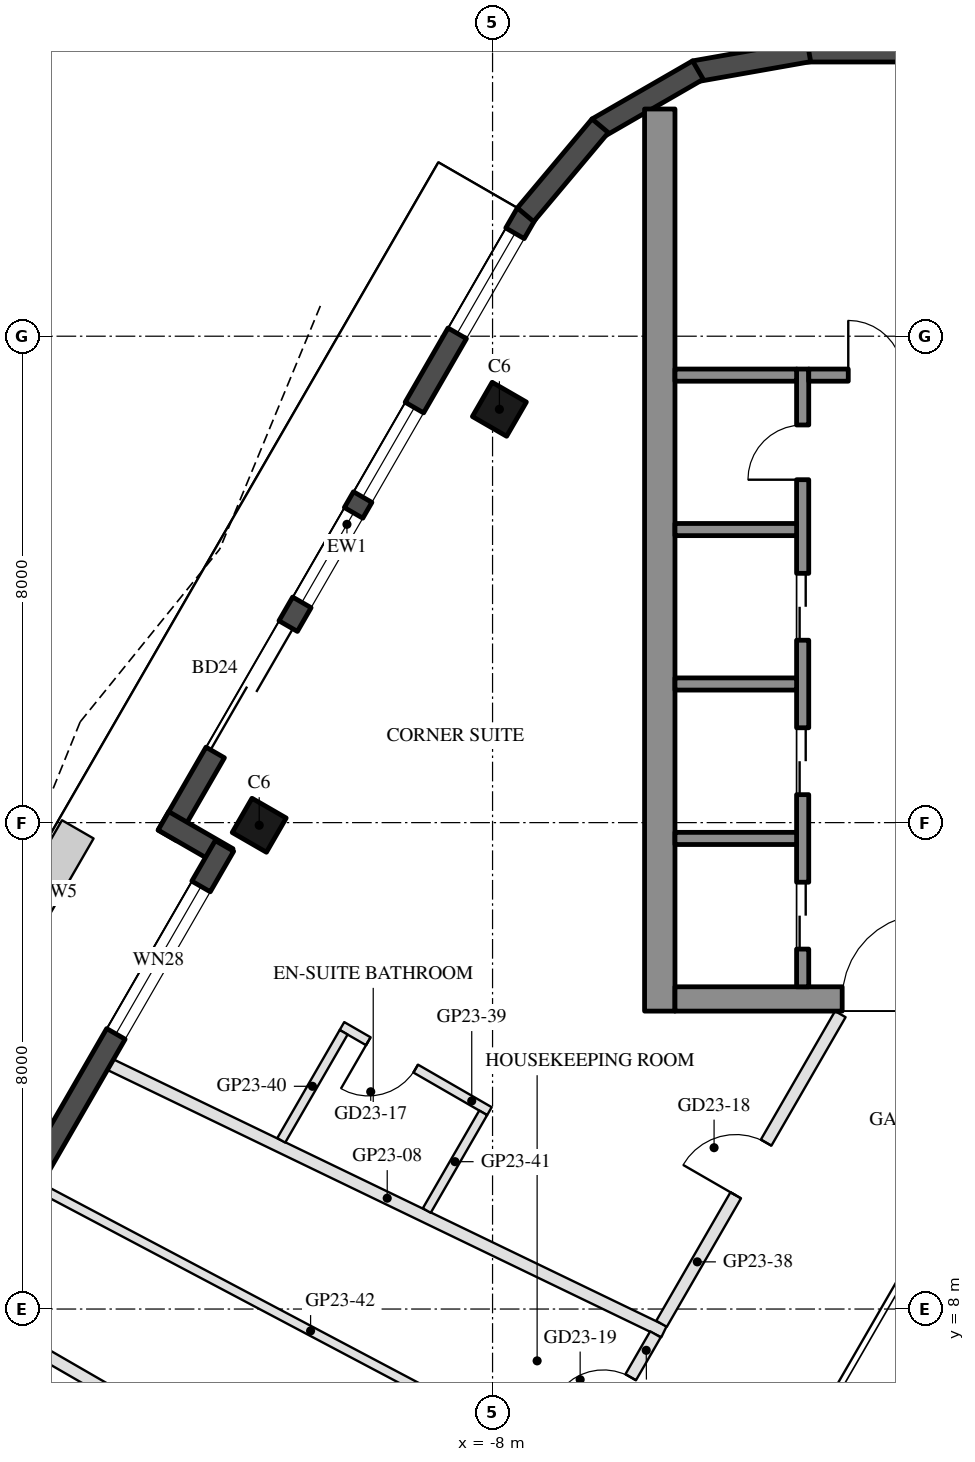
"""IFC4 building model, lengths in metres.
Left out: names, types, materials, properties, quantities, classifications, styles, units other than length and angle.
Written with IfcOpenShell. Run it as: python <this file> out.ifc"""

import sys

from ifc_helpers import new_model, si_unit, direction, frame, frame_2d, origin, origin_2d, place, context, subcontext, project, spatial, rectangle, hollow_rectangle, extrude, element, fill, save


model = new_model("IFC4")
c1 = context("Model", 3, precision=1e-05, world=origin(), true_north=direction((0.0, 1.0)))
c2 = subcontext(c1, "Body", "Model", "MODEL_VIEW")
j1 = project(units=[si_unit("LENGTHUNIT", "METRE"), si_unit("PLANEANGLEUNIT", "RADIAN")], contexts=[c1])
p1 = place(None, origin())
s1 = spatial("IfcSite", under=j1, at=p1, CompositionType="ELEMENT")
p2 = place(p1, origin())
s2 = spatial("IfcBuilding", under=s1, at=p2, CompositionType="ELEMENT")
p3 = place(p2, frame((0.0, 0.0, 246.7)))
s3 = spatial("IfcBuildingStorey", under=s2, at=p3, CompositionType="ELEMENT", Elevation=246.7)
for number, where, z_axis, x_axis in (
    (1, (-7.888, 22.798, 0.0), (0.0, 0.0, 1.0), (0.5, 0.866, 0.0)),
    (2, (-11.838, 15.957, 0.0), (0.0, 0.0, 1.0), (0.5, 0.866, 0.0)),
):
    element("IfcColumn", number, at=place(p3, frame(where, z_axis=z_axis, x_axis=x_axis)), inside=s3, PredefinedType="COLUMN", context=c2, shape_type="SweptSolid", body=[
        extrude(hollow_rectangle(XDim=0.65, YDim=0.65, WallThickness=0.03, at=origin_2d()), origin(), (0.0, 0.0, 1.0), 3.7),
    ])
p4 = place(p3, frame((-7.441, 26.022, 0.0), z_axis=(0.0, 0.0, 1.0), x_axis=(-0.499992533062, -0.86602971478, 0.0)))
e3 = element("IfcWall", 3, at=p4, inside=s3, PredefinedType="SOLIDWALL", context=c2, shape_type="SweptSolid", body=[
    extrude(rectangle(XDim=11.816, YDim=0.35, at=frame_2d((5.908, 0.0))), origin(), (0.0, 0.0, 1.0), 3.55),
])
p5 = place(p4, frame((0.381, 0.0, 0.3)))
e4 = element("IfcOpeningElement", 4, at=p5, cuts=e3, PredefinedType="OPENING", context=c2, shape_type="SweptSolid", body=[
    extrude(rectangle(XDim=1.9, YDim=2.65, at=frame_2d((0.95, 1.325))), frame((0.0, 0.185, 0.0), z_axis=(0.0, -1.0, 0.0), x_axis=(1.0, 0.0, 0.0)), (0.0, 0.0, 1.0), 0.37),
])
p6 = place(p4, frame((7.841, 0.0, 0.0)))
e5 = element("IfcOpeningElement", 5, at=p6, cuts=e3, PredefinedType="OPENING", context=c2, shape_type="SweptSolid", body=[
    extrude(rectangle(XDim=2.4, YDim=2.4, at=frame_2d((1.2, 1.2))), frame((0.0, 0.185, 0.0), z_axis=(0.0, -1.0, 0.0), x_axis=(1.0, 0.0, 0.0)), (0.0, 0.0, 1.0), 0.37),
])
p7 = place(p4, frame((3.69, 0.0, 0.3)))
e6 = element("IfcOpeningElement", 6, at=p7, cuts=e3, PredefinedType="OPENING", context=c2, shape_type="SweptSolid", body=[
    extrude(rectangle(XDim=1.7, YDim=2.65, at=frame_2d((0.85, 1.325))), frame((0.0, 0.185, 0.0), z_axis=(0.0, -1.0, 0.0), x_axis=(1.0, 0.0, 0.0)), (0.0, 0.0, 1.0), 0.37),
])
p8 = place(p4, frame((5.69, 0.0, 0.3)))
e7 = element("IfcOpeningElement", 7, at=p8, cuts=e3, PredefinedType="OPENING", context=c2, shape_type="SweptSolid", body=[
    extrude(rectangle(XDim=1.7, YDim=2.65, at=frame_2d((0.85, 1.325))), frame((0.0, 0.185, 0.0), z_axis=(0.0, -1.0, 0.0), x_axis=(1.0, 0.0, 0.0)), (0.0, 0.0, 1.0), 0.37),
])
p9 = place(p3, frame((-13.413, 16.029, 0.0), z_axis=(0.0, 0.0, 1.0), x_axis=(0.866005645448, -0.500034220881, 0.0)))
e8 = element("IfcWall", 8, at=p9, inside=s3, PredefinedType="SOLIDWALL", context=c2, shape_type="SweptSolid", body=[
    extrude(rectangle(XDim=1.22, YDim=0.35, at=frame_2d((0.61, 0.0))), origin(), (0.0, 0.0, 1.0), 3.55),
])
p10 = place(p3, frame((-12.409, 15.617, 0.0), z_axis=(0.0, 0.0, 1.0), x_axis=(-0.500003597184, -0.866023326939, 0.0)))
e9 = element("IfcWall", 9, at=p10, inside=s3, PredefinedType="SOLIDWALL", context=c2, shape_type="SweptSolid", body=[
    extrude(rectangle(XDim=6.74, YDim=0.35, at=frame_2d((3.37, 0.0))), origin(), (0.0, 0.0, 1.0), 3.55),
])
p11 = place(p10, frame((0.77, 0.0, 0.3)))
e10 = element("IfcOpeningElement", 10, at=p11, cuts=e9, PredefinedType="OPENING", context=c2, shape_type="SweptSolid", body=[
    extrude(rectangle(XDim=2.8, YDim=2.65, at=frame_2d((1.4, 1.325))), frame((0.0, 0.185, 0.0), z_axis=(0.0, -1.0, 0.0), x_axis=(1.0, 0.0, 0.0)), (0.0, 0.0, 1.0), 0.37),
])
p12 = place(p3, frame((2.829, 28.685, 0.0), z_axis=(0.0, 0.0, 1.0), x_axis=(-1.0, 0.0, 0.0)))
e11 = element("IfcWall", 11, at=p12, inside=s3, PredefinedType="SOLIDWALL", context=c2, shape_type="SweptSolid", body=[
    extrude(rectangle(XDim=5.658, YDim=0.35, at=frame_2d((2.829, 0.0))), origin(), (0.0, 0.0, 1.0), 3.55),
])
for number, where, z_axis, x_axis in (
    (12, (-2.799, 28.688, 0.0), (0.0, 0.0, 1.0), (-0.985, -0.174, 0.0)),
    (13, (-4.623, 28.377, 0.0), (0.0, 0.0, 1.0), (-0.866, -0.5, 0.0)),
):
    element("IfcWall", number, at=place(p3, frame(where, z_axis=z_axis, x_axis=x_axis)), inside=s3, PredefinedType="SOLIDWALL", context=c2, shape_type="SweptSolid", body=[
        extrude(rectangle(XDim=1.91, YDim=0.35, at=frame_2d((0.955, 0.0))), origin(), (0.0, 0.0, 1.0), 3.55),
    ])
p13 = place(p3, frame((-6.23, 27.461, 0.0), z_axis=(0.0, 0.0, 1.0), x_axis=(-0.642808304945, -0.766027077259, 0.0)))
e14 = element("IfcWall", 14, at=p13, inside=s3, PredefinedType="SOLIDWALL", context=c2, shape_type="SweptSolid", body=[
    extrude(rectangle(XDim=1.91, YDim=0.35, at=frame_2d((0.955, 0.0))), origin(), (0.0, 0.0, 1.0), 3.55),
])
p14 = place(p3, frame((-5.25, 12.9, 0.0), z_axis=(0.0, 0.0, 1.0), x_axis=(0.0, 1.0, 0.0)))
e15 = element("IfcWall", 15, at=p14, inside=s3, PredefinedType="SHEAR", context=c2, shape_type="SweptSolid", body=[
    extrude(rectangle(XDim=14.837, YDim=0.5, at=frame_2d((7.418, 0.0))), origin(), (0.0, 0.0, 1.0), 3.5),
])
p15 = place(p3, frame((5.0, 13.1, 0.0), z_axis=(0.0, 0.0, 1.0), x_axis=(-1.0, 0.0, 0.0)))
e16 = element("IfcWall", 16, at=p15, inside=s3, PredefinedType="SHEAR", context=c2, shape_type="SweptSolid", body=[
    extrude(rectangle(XDim=10.0, YDim=0.4, at=frame_2d((5.0, 0.0))), origin(), (0.0, 0.0, 1.0), 3.5),
])
p16 = place(p15, frame((3.55, 0.0, 0.0)))
e17 = element("IfcOpeningElement", 17, at=p16, cuts=e16, PredefinedType="OPENING", context=c2, shape_type="SweptSolid", body=[
    extrude(rectangle(XDim=1.1, YDim=2.1, at=frame_2d((0.55, 1.05))), frame((0.0, 0.21, 0.0), z_axis=(0.0, -1.0, 0.0), x_axis=(1.0, 0.0, 0.0)), (0.0, 0.0, 1.0), 0.42),
])
p17 = place(p15, frame((5.85, 0.0, 0.0)))
e18 = element("IfcOpeningElement", 18, at=p17, cuts=e16, PredefinedType="OPENING", context=c2, shape_type="SweptSolid", body=[
    extrude(rectangle(XDim=1.4, YDim=2.1, at=frame_2d((0.7, 1.05))), frame((0.0, 0.21, 0.0), z_axis=(0.0, -1.0, 0.0), x_axis=(1.0, 0.0, 0.0)), (0.0, 0.0, 1.0), 0.42),
])
p18 = place(p3, frame((-2.9, 13.3, 0.0), z_axis=(0.0, 0.0, 1.0), x_axis=(0.0, 1.0, 0.0)))
e19 = element("IfcWall", 19, at=p18, inside=s3, PredefinedType="SHEAR", context=c2, shape_type="SweptSolid", body=[
    extrude(rectangle(XDim=10.16, YDim=0.2, at=frame_2d((5.08, 0.0))), origin(), (0.0, 0.0, 1.0), 3.5),
])
p19 = place(p18, frame((0.62, 0.0, 0.0)))
e20 = element("IfcOpeningElement", 20, at=p19, cuts=e19, PredefinedType="OPENING", context=c2, shape_type="SweptSolid", body=[
    extrude(rectangle(XDim=1.1, YDim=2.1, at=frame_2d((0.55, 1.05))), frame((0.0, 0.11, 0.0), z_axis=(0.0, -1.0, 0.0), x_axis=(1.0, 0.0, 0.0)), (0.0, 0.0, 1.0), 0.22),
])
p20 = place(p18, frame((3.16, 0.0, 0.0)))
e21 = element("IfcOpeningElement", 21, at=p20, cuts=e19, PredefinedType="OPENING", context=c2, shape_type="SweptSolid", body=[
    extrude(rectangle(XDim=1.1, YDim=2.1, at=frame_2d((0.55, 1.05))), frame((0.0, 0.11, 0.0), z_axis=(0.0, -1.0, 0.0), x_axis=(1.0, 0.0, 0.0)), (0.0, 0.0, 1.0), 0.22),
])
p21 = place(p18, frame((5.7, 0.0, 0.0)))
e22 = element("IfcOpeningElement", 22, at=p21, cuts=e19, PredefinedType="OPENING", context=c2, shape_type="SweptSolid", body=[
    extrude(rectangle(XDim=1.1, YDim=2.1, at=frame_2d((0.55, 1.05))), frame((0.0, 0.11, 0.0), z_axis=(0.0, -1.0, 0.0), x_axis=(1.0, 0.0, 0.0)), (0.0, 0.0, 1.0), 0.22),
])
p22 = place(p18, frame((8.34, 0.0, 0.0)))
e23 = element("IfcOpeningElement", 23, at=p22, cuts=e19, PredefinedType="OPENING", context=c2, shape_type="SweptSolid", body=[
    extrude(rectangle(XDim=0.9, YDim=2.1, at=frame_2d((0.45, 1.05))), frame((0.0, 0.11, 0.0), z_axis=(0.0, -1.0, 0.0), x_axis=(1.0, 0.0, 0.0)), (0.0, 0.0, 1.0), 0.22),
])
p23 = place(p3, frame((-0.4, 23.36, 0.0), z_axis=(0.0, 0.0, 1.0), x_axis=(-1.0, 0.0, 0.0)))
e24 = element("IfcWall", 24, at=p23, inside=s3, PredefinedType="SHEAR", context=c2, shape_type="SweptSolid", body=[
    extrude(rectangle(XDim=2.4, YDim=0.2, at=frame_2d((1.2, 0.0))), origin(), (0.0, 0.0, 1.0), 3.5),
])
p24 = place(p23, frame((0.85, 0.0, 0.0)))
e25 = element("IfcOpeningElement", 25, at=p24, cuts=e24, PredefinedType="OPENING", context=c2, shape_type="SweptSolid", body=[
    extrude(rectangle(XDim=0.9, YDim=2.1, at=frame_2d((0.45, 1.05))), frame((0.0, 0.11, 0.0), z_axis=(0.0, -1.0, 0.0), x_axis=(1.0, 0.0, 0.0)), (0.0, 0.0, 1.0), 0.22),
])
for number, where, z_axis, x_axis in (
    (26, (-3.0, 15.74, 0.0), (0.0, 0.0, 1.0), (-1.0, 0.0, 0.0)),
    (27, (-3.0, 18.28, 0.0), (0.0, 0.0, 1.0), (-1.0, 0.0, 0.0)),
    (28, (-3.0, 20.82, 0.0), (0.0, 0.0, 1.0), (-1.0, 0.0, 0.0)),
    (29, (-3.0, 23.36, 0.0), (0.0, 0.0, 1.0), (-1.0, 0.0, 0.0)),
):
    element("IfcWall", number, at=place(p3, frame(where, z_axis=z_axis, x_axis=x_axis)), inside=s3, PredefinedType="SHEAR", context=c2, shape_type="SweptSolid", body=[
        extrude(rectangle(XDim=2.0, YDim=0.2, at=frame_2d((1.0, 0.0))), origin(), (0.0, 0.0, 1.0), 3.5),
    ])
p25 = place(p3, frame((-14.284, 12.019, 0.0), z_axis=(0.0, 0.0, 1.0), x_axis=(0.90065661155, -0.434531550144, 0.0)))
e30 = element("IfcWall", 30, at=p25, inside=s3, PredefinedType="PARTITIONING", context=c2, shape_type="SweptSolid", body=[
    extrude(rectangle(XDim=10.108, YDim=0.2, at=frame_2d((5.054, 0.0))), origin(), (0.0, 0.0, 1.0), 2.95),
])
p26 = place(p3, frame((-17.397, 8.427, 0.0), z_axis=(0.0, 0.0, 1.0), x_axis=(0.866027479907, -0.499996404033, 0.0)))
e31 = element("IfcWall", 31, at=p26, inside=s3, PredefinedType="PARTITIONING", context=c2, shape_type="SweptSolid", body=[
    extrude(rectangle(XDim=10.98, YDim=0.2, at=frame_2d((5.49, 0.0))), origin(), (0.0, 0.0, 1.0), 3.16),
])
p27 = place(p3, frame((-5.221, 7.757, 0.0), z_axis=(0.0, 0.0, 1.0), x_axis=(0.49998360248, 0.86603487069, 0.0)))
e32 = element("IfcWall", 32, at=p27, inside=s3, PredefinedType="PARTITIONING", context=c2, shape_type="SweptSolid", body=[
    extrude(rectangle(XDim=5.881, YDim=0.2, at=frame_2d((2.94, 0.0))), origin(), (0.0, 0.0, 1.0), 2.95),
])
p28 = place(p27, frame((2.44, 0.0, 0.0)))
e33 = element("IfcOpeningElement", 33, at=p28, cuts=e32, PredefinedType="OPENING", context=c2, shape_type="SweptSolid", body=[
    extrude(rectangle(XDim=1.0, YDim=2.1, at=frame_2d((0.5, 1.05))), frame((0.0, 0.11, 0.0), z_axis=(0.0, -1.0, 0.0), x_axis=(1.0, 0.0, 0.0)), (0.0, 0.0, 1.0), 0.22),
])
p29 = place(p3, frame((-8.052, 11.254, 0.0), z_axis=(0.0, 0.0, 1.0), x_axis=(-0.865996816683, 0.500049511043, 0.0)))
e34 = element("IfcWall", 34, at=p29, inside=s3, PredefinedType="PARTITIONING", context=c2, shape_type="SweptSolid", body=[
    extrude(rectangle(XDim=2.8, YDim=0.15, at=frame_2d((1.4, 0.0))), origin(), (0.0, 0.0, 1.0), 3.55),
])
p30 = place(p29, frame((1.4, 0.0, 0.0)))
e35 = element("IfcOpeningElement", 35, at=p30, cuts=e34, PredefinedType="OPENING", context=c2, shape_type="SweptSolid", body=[
    extrude(rectangle(XDim=0.9, YDim=2.1, at=frame_2d((0.45, 1.05))), frame((0.0, 0.085, 0.0), z_axis=(0.0, -1.0, 0.0), x_axis=(1.0, 0.0, 0.0)), (0.0, 0.0, 1.0), 0.17),
])
p31 = place(p3, frame((-10.449, 12.552, 0.0), z_axis=(0.0, 0.0, 1.0), x_axis=(-0.500041704412, -0.866001324392, 0.0)))
e36 = element("IfcWall", 36, at=p31, inside=s3, PredefinedType="PARTITIONING", context=c2, shape_type="SweptSolid", body=[
    extrude(rectangle(XDim=2.052, YDim=0.15, at=frame_2d((1.026, 0.0))), origin(), (0.0, 0.0, 1.0), 2.95),
])
p32 = place(p3, frame((-8.154, 11.227, 0.0), z_axis=(0.0, 0.0, 1.0), x_axis=(-0.500086883948, -0.865975235502, 0.0)))
e37 = element("IfcWall", 37, at=p32, inside=s3, PredefinedType="PARTITIONING", context=c2, shape_type="SweptSolid", body=[
    extrude(rectangle(XDim=1.856, YDim=0.15, at=frame_2d((0.928, 0.0))), origin(), (0.0, 0.0, 1.0), 2.95),
])
p33 = place(p3, frame((-15.451, 9.998, 0.0), z_axis=(0.0, 0.0, 1.0), x_axis=(0.883969770247, -0.467544057058, 0.0)))
e38 = element("IfcWall", 38, at=p33, inside=s3, PredefinedType="PARTITIONING", context=c2, shape_type="SweptSolid", body=[
    extrude(rectangle(XDim=10.087, YDim=0.15, at=frame_2d((5.043, 0.0))), origin(), (0.0, 0.0, 1.0), 3.16),
])
p34 = place(p3, frame((-6.585, 5.394, 0.0), z_axis=(0.0, 0.0, 1.0), x_axis=(0.499981564561, 0.866036047228, 0.0)))
e39 = element("IfcWall", 39, at=p34, inside=s3, PredefinedType="PARTITIONING", context=c2, shape_type="SweptSolid", body=[
    extrude(rectangle(XDim=2.528, YDim=0.2, at=frame_2d((1.264, 0.0))), origin(), (0.0, 0.0, 1.0), 2.95),
])
p35 = place(p34, frame((0.814, 0.0, 0.0)))
e40 = element("IfcOpeningElement", 40, at=p35, cuts=e39, PredefinedType="OPENING", context=c2, shape_type="SweptSolid", body=[
    extrude(rectangle(XDim=0.9, YDim=2.1, at=frame_2d((0.45, 1.05))), frame((0.0, 0.11, 0.0), z_axis=(0.0, -1.0, 0.0), x_axis=(1.0, 0.0, 0.0)), (0.0, 0.0, 1.0), 0.22),
])
p36 = place(p5, origin())
e41 = element("IfcWindow", 41, at=p36, inside=s3, PartitioningType="SINGLE_PANEL", PredefinedType="WINDOW", context=c2, shape_type="SweptSolid", body=[
    extrude(rectangle(XDim=1.9, YDim=2.65, at=frame_2d((0.95, 1.325))), frame((0.0, 0.03, 0.0), z_axis=(0.0, -1.0, 0.0), x_axis=(1.0, 0.0, 0.0)), (0.0, 0.0, 1.0), 0.06),
])
fill(e4, e41)
p37 = place(p6, frame((2.4, 0.0, 0.0), z_axis=(0.0, 0.0, 1.0), x_axis=(-1.0, 0.0, 0.0)))
e42 = element("IfcDoor", 42, at=p37, inside=s3, OperationType="SLIDING_TO_LEFT", PredefinedType="DOOR", context=c2, shape_type="SweptSolid", body=[
    extrude(rectangle(XDim=2.4, YDim=2.4, at=frame_2d((1.2, 1.2))), frame((0.0, 0.025, 0.0), z_axis=(0.0, -1.0, 0.0), x_axis=(1.0, 0.0, 0.0)), (0.0, 0.0, 1.0), 0.05),
])
fill(e5, e42)
p38 = place(p7, origin())
e43 = element("IfcWindow", 43, at=p38, inside=s3, PartitioningType="SINGLE_PANEL", PredefinedType="WINDOW", context=c2, shape_type="SweptSolid", body=[
    extrude(rectangle(XDim=1.7, YDim=2.65, at=frame_2d((0.85, 1.325))), frame((0.0, 0.03, 0.0), z_axis=(0.0, -1.0, 0.0), x_axis=(1.0, 0.0, 0.0)), (0.0, 0.0, 1.0), 0.06),
])
fill(e6, e43)
p39 = place(p8, origin())
e44 = element("IfcWindow", 44, at=p39, inside=s3, PartitioningType="SINGLE_PANEL", PredefinedType="WINDOW", context=c2, shape_type="SweptSolid", body=[
    extrude(rectangle(XDim=1.7, YDim=2.65, at=frame_2d((0.85, 1.325))), frame((0.0, 0.03, 0.0), z_axis=(0.0, -1.0, 0.0), x_axis=(1.0, 0.0, 0.0)), (0.0, 0.0, 1.0), 0.06),
])
fill(e7, e44)
p40 = place(p11, origin())
e45 = element("IfcWindow", 45, at=p40, inside=s3, PartitioningType="SINGLE_PANEL", PredefinedType="WINDOW", context=c2, shape_type="SweptSolid", body=[
    extrude(rectangle(XDim=2.8, YDim=2.65, at=frame_2d((1.4, 1.325))), frame((0.0, 0.03, 0.0), z_axis=(0.0, -1.0, 0.0), x_axis=(1.0, 0.0, 0.0)), (0.0, 0.0, 1.0), 0.06),
])
fill(e10, e45)
p41 = place(p19, origin())
e46 = element("IfcDoor", 46, at=p41, inside=s3, OperationType="DOUBLE_DOOR_SLIDING", PredefinedType="DOOR", context=c2, shape_type="SweptSolid", body=[
    extrude(rectangle(XDim=1.1, YDim=2.1, at=frame_2d((0.55, 1.05))), frame((0.0, 0.025, 0.0), z_axis=(0.0, -1.0, 0.0), x_axis=(1.0, 0.0, 0.0)), (0.0, 0.0, 1.0), 0.05),
])
fill(e20, e46)
p42 = place(p20, origin())
e47 = element("IfcDoor", 47, at=p42, inside=s3, OperationType="DOUBLE_DOOR_SLIDING", PredefinedType="DOOR", context=c2, shape_type="SweptSolid", body=[
    extrude(rectangle(XDim=1.1, YDim=2.1, at=frame_2d((0.55, 1.05))), frame((0.0, 0.025, 0.0), z_axis=(0.0, -1.0, 0.0), x_axis=(1.0, 0.0, 0.0)), (0.0, 0.0, 1.0), 0.05),
])
fill(e21, e47)
p43 = place(p21, origin())
e48 = element("IfcDoor", 48, at=p43, inside=s3, OperationType="DOUBLE_DOOR_SLIDING", PredefinedType="DOOR", context=c2, shape_type="SweptSolid", body=[
    extrude(rectangle(XDim=1.1, YDim=2.1, at=frame_2d((0.55, 1.05))), frame((0.0, 0.025, 0.0), z_axis=(0.0, -1.0, 0.0), x_axis=(1.0, 0.0, 0.0)), (0.0, 0.0, 1.0), 0.05),
])
fill(e22, e48)
p44 = place(p22, origin())
e49 = element("IfcDoor", 49, at=p44, inside=s3, OperationType="SINGLE_SWING_LEFT", PredefinedType="DOOR", context=c2, shape_type="SweptSolid", body=[
    extrude(rectangle(XDim=0.9, YDim=2.1, at=frame_2d((0.45, 1.05))), frame((0.0, 0.025, 0.0), z_axis=(0.0, -1.0, 0.0), x_axis=(1.0, 0.0, 0.0)), (0.0, 0.0, 1.0), 0.05),
])
fill(e23, e49)
p45 = place(p24, frame((0.9, 0.0, 0.0), z_axis=(0.0, 0.0, 1.0), x_axis=(-1.0, 0.0, 0.0)))
e50 = element("IfcDoor", 50, at=p45, inside=s3, OperationType="SINGLE_SWING_LEFT", PredefinedType="DOOR", context=c2, shape_type="SweptSolid", body=[
    extrude(rectangle(XDim=0.9, YDim=2.1, at=frame_2d((0.45, 1.05))), frame((0.0, 0.025, 0.0), z_axis=(0.0, -1.0, 0.0), x_axis=(1.0, 0.0, 0.0)), (0.0, 0.0, 1.0), 0.05),
])
fill(e25, e50)
p46 = place(p17, frame((1.4, 0.0, 0.0), z_axis=(0.0, 0.0, 1.0), x_axis=(-1.0, 0.0, 0.0)))
e51 = element("IfcDoor", 51, at=p46, inside=s3, OperationType="DOUBLE_DOOR_SINGLE_SWING", PredefinedType="DOOR", context=c2, shape_type="SweptSolid", body=[
    extrude(rectangle(XDim=1.4, YDim=2.1, at=frame_2d((0.7, 1.05))), frame((0.0, 0.025, 0.0), z_axis=(0.0, -1.0, 0.0), x_axis=(1.0, 0.0, 0.0)), (0.0, 0.0, 1.0), 0.05),
])
fill(e18, e51)
p47 = place(p30, origin())
e52 = element("IfcDoor", 52, at=p47, inside=s3, OperationType="SINGLE_SWING_RIGHT", PredefinedType="DOOR", context=c2, shape_type="SweptSolid", body=[
    extrude(rectangle(XDim=0.9, YDim=2.1, at=frame_2d((0.45, 1.05))), frame((0.0, 0.025, 0.0), z_axis=(0.0, -1.0, 0.0), x_axis=(1.0, 0.0, 0.0)), (0.0, 0.0, 1.0), 0.05),
])
fill(e35, e52)
p48 = place(p28, origin())
e53 = element("IfcDoor", 53, at=p48, inside=s3, OperationType="SINGLE_SWING_LEFT", PredefinedType="DOOR", context=c2, shape_type="SweptSolid", body=[
    extrude(rectangle(XDim=1.0, YDim=2.1, at=frame_2d((0.5, 1.05))), frame((0.0, 0.025, 0.0), z_axis=(0.0, -1.0, 0.0), x_axis=(1.0, 0.0, 0.0)), (0.0, 0.0, 1.0), 0.05),
])
fill(e33, e53)
p49 = place(p35, origin())
e54 = element("IfcDoor", 54, at=p49, inside=s3, OperationType="SINGLE_SWING_LEFT", PredefinedType="DOOR", context=c2, shape_type="SweptSolid", body=[
    extrude(rectangle(XDim=0.9, YDim=2.1, at=frame_2d((0.45, 1.05))), frame((0.0, 0.025, 0.0), z_axis=(0.0, -1.0, 0.0), x_axis=(1.0, 0.0, 0.0)), (0.0, 0.0, 1.0), 0.05),
])
fill(e40, e54)
save(model, sys.argv[1])
